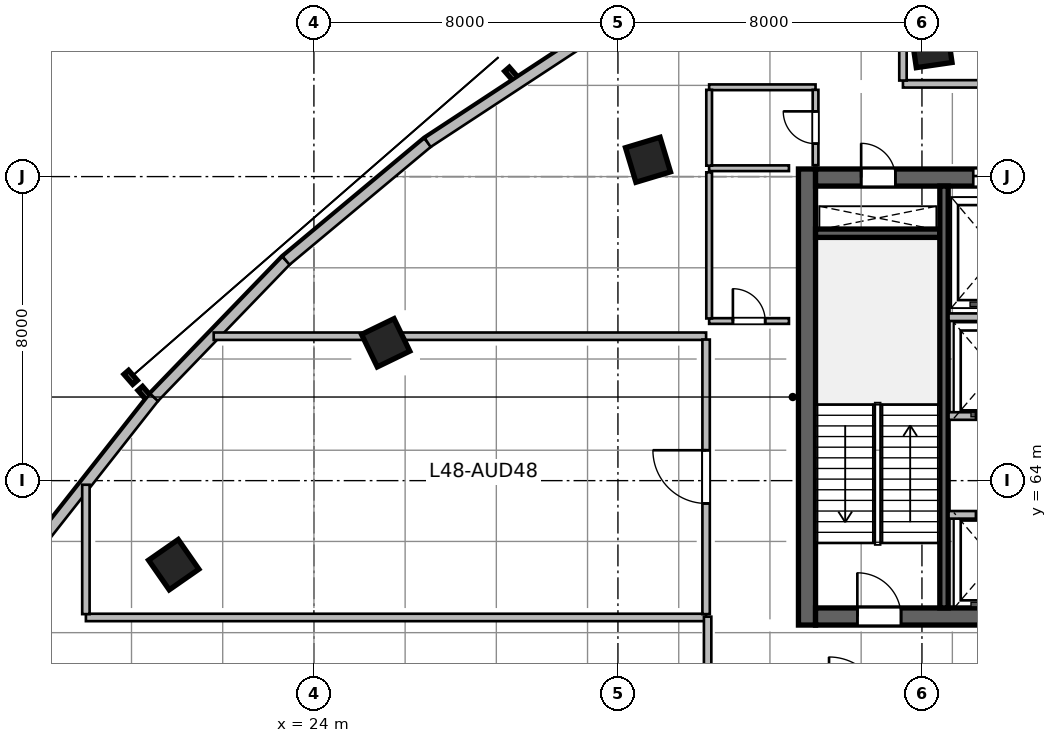
"""IFC4 building model, lengths in metres.
Left out: names, types, materials, properties, quantities, classifications, styles, units other than length and angle.
Written with IfcOpenShell. Run it as: python <this file> out.ifc"""

import sys

from ifc_helpers import new_model, si_unit, direction, frame, frame_2d, origin, origin_2d, place, context, subcontext, project, spatial, rectangle, extrude, source, transform, mapped, element, fill, save


model = new_model("IFC4")
c1 = context("Model", 3, precision=1e-05, world=origin(), true_north=direction((0.0, 1.0)))
c2 = subcontext(c1, "Body", "Model", "MODEL_VIEW")
j1 = project(units=[si_unit("LENGTHUNIT", "METRE"), si_unit("PLANEANGLEUNIT", "RADIAN")], contexts=[c1])
p1 = place(None, origin())
s1 = spatial("IfcSite", under=j1, at=p1, CompositionType="ELEMENT")
p2 = place(p1, origin())
s2 = spatial("IfcBuilding", under=s1, at=p2, CompositionType="ELEMENT")
p3 = place(p2, frame((0.0, 0.0, 199.2)))
s3 = spatial("IfcBuildingStorey", under=s2, at=p3, CompositionType="ELEMENT", Elevation=199.2)
m1 = source(origin(), c2, "Body", "SweptSolid", [
    extrude(rectangle(XDim=12.0, YDim=0.45, at=frame_2d((6.0, 0.0))), origin(), (0.0, 0.0, 1.0), 4.8),
])
p4 = place(p3, frame((36.975, 60.2, 0.0), z_axis=(0.0, 0.0, 1.0), x_axis=(0.0, 1.0, 0.0)))
e1 = element("IfcWall", 1, at=p4, inside=s3, PredefinedType="SHEAR", context=c2, shape_type="MappedRepresentation", body=[
    mapped(m1, transform((0.0, 0.0, 0.0), scale=1.0)),
])
m2 = source(origin(), c2, "Body", "SweptSolid", [
    extrude(rectangle(XDim=21.6, YDim=0.45, at=frame_2d((10.8, 0.0))), origin(), (0.0, 0.0, 1.0), 4.8),
])
p5 = place(p3, frame((37.2, 60.425, 0.0), z_axis=(0.0, 0.0, 1.0), x_axis=(1.0, 0.0, 0.0)))
e2 = element("IfcWall", 2, at=p5, inside=s3, PredefinedType="SHEAR", context=c2, shape_type="MappedRepresentation", body=[
    mapped(m2, transform((0.0, 0.0, 0.0), scale=1.0)),
])
p6 = place(p5, frame((1.1, 0.0, 0.0)))
e3 = element("IfcOpeningElement", 3, at=p6, cuts=e2, PredefinedType="OPENING", context=c2, shape_type="SweptSolid", body=[
    extrude(rectangle(XDim=1.15, YDim=2.15, at=frame_2d((0.575, 1.075))), frame((0.0, 0.235, 0.0), z_axis=(0.0, -1.0, 0.0), x_axis=(1.0, 0.0, 0.0)), (0.0, 0.0, 1.0), 0.47),
])
p7 = place(p5, frame((19.5, 0.0, 0.0)))
e4 = element("IfcOpeningElement", 4, at=p7, cuts=e2, PredefinedType="OPENING", context=c2, shape_type="SweptSolid", body=[
    extrude(rectangle(XDim=0.9, YDim=2.1, at=frame_2d((0.45, 1.05))), frame((0.0, 0.235, 0.0), z_axis=(0.0, -1.0, 0.0), x_axis=(1.0, 0.0, 0.0)), (0.0, 0.0, 1.0), 0.47),
])
p8 = place(p5, frame((12.02, 0.0, 0.0)))
e5 = element("IfcOpeningElement", 5, at=p8, cuts=e2, PredefinedType="OPENING", context=c2, shape_type="SweptSolid", body=[
    extrude(rectangle(XDim=1.6, YDim=2.15, at=frame_2d((0.8, 1.075))), frame((0.0, 0.235, 0.0), z_axis=(0.0, -1.0, 0.0), x_axis=(1.0, 0.0, 0.0)), (0.0, 0.0, 1.0), 0.47),
])
p9 = place(p3, frame((37.2, 71.975, 0.0), z_axis=(0.0, 0.0, 1.0), x_axis=(1.0, 0.0, 0.0)))
e6 = element("IfcWall", 6, at=p9, inside=s3, PredefinedType="SHEAR", context=c2, shape_type="MappedRepresentation", body=[
    mapped(m2, transform((0.0, 0.0, 0.0), scale=1.0)),
])
p10 = place(p9, frame((1.2, 0.0, 0.0)))
e7 = element("IfcOpeningElement", 7, at=p10, cuts=e6, PredefinedType="OPENING", context=c2, shape_type="SweptSolid", body=[
    extrude(rectangle(XDim=0.9, YDim=2.1, at=frame_2d((0.45, 1.05))), frame((0.0, 0.235, 0.0), z_axis=(0.0, -1.0, 0.0), x_axis=(1.0, 0.0, 0.0)), (0.0, 0.0, 1.0), 0.47),
])
p11 = place(p9, frame((14.7, 0.0, 0.0)))
e8 = element("IfcOpeningElement", 8, at=p11, cuts=e6, PredefinedType="OPENING", context=c2, shape_type="SweptSolid", body=[
    extrude(rectangle(XDim=1.2, YDim=2.15, at=frame_2d((0.6, 1.075))), frame((0.0, 0.235, 0.0), z_axis=(0.0, -1.0, 0.0), x_axis=(1.0, 0.0, 0.0)), (0.0, 0.0, 1.0), 0.47),
])
p12 = place(p9, frame((4.15, 0.0, 0.0)))
e9 = element("IfcOpeningElement", 9, at=p12, cuts=e6, PredefinedType="OPENING", context=c2, shape_type="SweptSolid", body=[
    extrude(rectangle(XDim=1.3, YDim=2.15, at=frame_2d((0.65, 1.075))), frame((0.0, 0.235, 0.0), z_axis=(0.0, -1.0, 0.0), x_axis=(1.0, 0.0, 0.0)), (0.0, 0.0, 1.0), 0.47),
])
p13 = place(p9, frame((7.25, 0.0, 0.0)))
e10 = element("IfcOpeningElement", 10, at=p13, cuts=e6, PredefinedType="OPENING", context=c2, shape_type="SweptSolid", body=[
    extrude(rectangle(XDim=0.9, YDim=2.1, at=frame_2d((0.45, 1.05))), frame((0.0, 0.235, 0.0), z_axis=(0.0, -1.0, 0.0), x_axis=(1.0, 0.0, 0.0)), (0.0, 0.0, 1.0), 0.47),
])
p14 = place(p9, frame((10.95, 0.0, 0.0)))
e11 = element("IfcOpeningElement", 11, at=p14, cuts=e6, PredefinedType="OPENING", context=c2, shape_type="SweptSolid", body=[
    extrude(rectangle(XDim=0.9, YDim=2.1, at=frame_2d((0.45, 1.05))), frame((0.0, 0.235, 0.0), z_axis=(0.0, -1.0, 0.0), x_axis=(1.0, 0.0, 0.0)), (0.0, 0.0, 1.0), 0.47),
])
m3 = source(origin(), c2, "Body", "SweptSolid", [
    extrude(rectangle(XDim=3.27, YDim=0.22, at=frame_2d((1.635, 0.0))), origin(), (0.0, 0.0, 1.0), 4.8),
])
p15 = place(p3, frame((37.2, 70.51, 0.0), z_axis=(0.0, 0.0, 1.0), x_axis=(1.0, 0.0, 0.0)))
e12 = element("IfcWall", 12, at=p15, inside=s3, PredefinedType="SHEAR", context=c2, shape_type="MappedRepresentation", body=[
    mapped(m3, transform((0.0, 0.0, 0.0), scale=1.0)),
])
m4 = source(origin(), c2, "Body", "SweptSolid", [
    extrude(rectangle(XDim=11.1, YDim=0.22, at=frame_2d((5.55, 0.0))), origin(), (0.0, 0.0, 1.0), 4.8),
])
p16 = place(p3, frame((40.58, 60.65, 0.0), z_axis=(0.0, 0.0, 1.0), x_axis=(0.0, 1.0, 0.0)))
e13 = element("IfcWall", 13, at=p16, inside=s3, PredefinedType="SHEAR", context=c2, shape_type="MappedRepresentation", body=[
    mapped(m4, transform((0.0, 0.0, 0.0), scale=1.0)),
])
m5 = source(origin(), c2, "Body", "SweptSolid", [
    extrude(rectangle(XDim=0.95, YDim=0.95, at=origin_2d()), origin(), (0.0, 0.0, 1.0), 4.8),
])
for number, where, z_axis, x_axis in (
    (14, (20.311, 61.789, 0.0), (0.0, 0.0, 1.0), (-0.571, 0.821, 0.0)),
    (15, (25.888, 67.627, 0.0), (0.0, 0.0, 1.0), (-0.436, 0.9, 0.0)),
    (16, (32.791, 72.442, 0.0), (0.0, 0.0, 1.0), (-0.289, 0.957, 0.0)),
    (17, (40.253, 75.404, 0.0), (0.0, 0.0, 1.0), (-0.143, 0.99, 0.0)),
):
    element("IfcColumn", number, at=place(p3, frame(where, z_axis=z_axis, x_axis=x_axis)), inside=s3, PredefinedType="COLUMN", context=c2, shape_type="MappedRepresentation", body=[
        mapped(m5, transform((0.0, 0.0, 0.0), scale=1.0)),
    ])
m6 = source(origin(), c2, "Body", "SweptSolid", [
    extrude(rectangle(XDim=5.153, YDim=0.28, at=frame_2d((2.577, 0.0))), origin(), (0.0, 0.0, 1.0), 4.54),
])
p17 = place(p3, frame((16.609, 62.14, 0.0), z_axis=(0.0, 0.0, 1.0), x_axis=(0.618179283891, 0.786037132054, 0.0)))
e18 = element("IfcWall", 18, at=p17, inside=s3, PredefinedType="SOLIDWALL", context=c2, shape_type="MappedRepresentation", body=[
    mapped(m6, transform((0.0, 0.0, 0.0), scale=1.0)),
])
m7 = source(origin(), c2, "Body", "SweptSolid", [
    extrude(rectangle(XDim=5.001, YDim=0.28, at=frame_2d((2.5, 0.0))), origin(), (0.0, 0.0, 1.0), 4.54),
])
p18 = place(p3, frame((19.795, 66.19, 0.0), z_axis=(0.0, 0.0, 1.0), x_axis=(0.694572731818, 0.719422490762, 0.0)))
e19 = element("IfcWall", 19, at=p18, inside=s3, PredefinedType="SOLIDWALL", context=c2, shape_type="MappedRepresentation", body=[
    mapped(m7, transform((0.0, 0.0, 0.0), scale=1.0)),
])
m8 = source(origin(), c2, "Body", "SweptSolid", [
    extrude(rectangle(XDim=4.852, YDim=0.28, at=frame_2d((2.426, 0.0))), origin(), (0.0, 0.0, 1.0), 4.54),
])
p19 = place(p3, frame((23.268, 69.788, 0.0), z_axis=(0.0, 0.0, 1.0), x_axis=(0.767936605821, 0.640525853843, 0.0)))
e20 = element("IfcWall", 20, at=p19, inside=s3, PredefinedType="SOLIDWALL", context=c2, shape_type="MappedRepresentation", body=[
    mapped(m8, transform((0.0, 0.0, 0.0), scale=1.0)),
])
m9 = source(origin(), c2, "Body", "SweptSolid", [
    extrude(rectangle(XDim=4.713, YDim=0.28, at=frame_2d((2.356, 0.0))), origin(), (0.0, 0.0, 1.0), 4.54),
])
p20 = place(p3, frame((26.994, 72.896, 0.0), z_axis=(0.0, 0.0, 1.0), x_axis=(0.835974386457, 0.548768462275, 0.0)))
e21 = element("IfcWall", 21, at=p20, inside=s3, PredefinedType="SOLIDWALL", context=c2, shape_type="MappedRepresentation", body=[
    mapped(m9, transform((0.0, 0.0, 0.0), scale=1.0)),
])
m10 = source(origin(), c2, "Body", "SweptSolid", [
    extrude(rectangle(XDim=8.8, YDim=0.2, at=frame_2d((4.4, 0.0))), origin(), (0.0, 0.0, 1.0), 4.54),
])
p21 = place(p3, frame((40.7, 68.3, 0.0), z_axis=(0.0, 0.0, 1.0), x_axis=(1.0, 0.0, 0.0)))
e22 = element("IfcWall", 22, at=p21, inside=s3, PredefinedType="SOLIDWALL", context=c2, shape_type="MappedRepresentation", body=[
    mapped(m10, transform((0.0, 0.0, 0.0), scale=1.0)),
])
m11 = source(origin(), c2, "Body", "SweptSolid", [
    extrude(rectangle(XDim=8.02, YDim=0.2, at=frame_2d((4.01, 0.0))), origin(), (0.0, 0.0, 1.0), 4.54),
])
p22 = place(p3, frame((40.7, 63.1, 0.0), z_axis=(0.0, 0.0, 1.0), x_axis=(1.0, 0.0, 0.0)))
e23 = element("IfcWall", 23, at=p22, inside=s3, PredefinedType="SOLIDWALL", context=c2, shape_type="MappedRepresentation", body=[
    mapped(m11, transform((0.0, 0.0, 0.0), scale=1.0)),
])
p23 = place(p22, frame((0.72, 0.0, 0.0)))
e24 = element("IfcOpeningElement", 24, at=p23, cuts=e23, PredefinedType="OPENING", context=c2, shape_type="SweptSolid", body=[
    extrude(rectangle(XDim=1.0, YDim=2.15, at=frame_2d((0.5, 1.075))), frame((0.0, 0.11, 0.0), z_axis=(0.0, -1.0, 0.0), x_axis=(1.0, 0.0, 0.0)), (0.0, 0.0, 1.0), 0.22),
])
p24 = place(p22, frame((2.62, 0.0, 0.0)))
e25 = element("IfcOpeningElement", 25, at=p24, cuts=e23, PredefinedType="OPENING", context=c2, shape_type="SweptSolid", body=[
    extrude(rectangle(XDim=1.0, YDim=2.15, at=frame_2d((0.5, 1.075))), frame((0.0, 0.11, 0.0), z_axis=(0.0, -1.0, 0.0), x_axis=(1.0, 0.0, 0.0)), (0.0, 0.0, 1.0), 0.22),
])
p25 = place(p22, frame((4.55, 0.0, 0.0)))
e26 = element("IfcOpeningElement", 26, at=p25, cuts=e23, PredefinedType="OPENING", context=c2, shape_type="SweptSolid", body=[
    extrude(rectangle(XDim=1.0, YDim=2.15, at=frame_2d((0.5, 1.075))), frame((0.0, 0.11, 0.0), z_axis=(0.0, -1.0, 0.0), x_axis=(1.0, 0.0, 0.0)), (0.0, 0.0, 1.0), 0.22),
])
p26 = place(p22, frame((6.55, 0.0, 0.0)))
e27 = element("IfcOpeningElement", 27, at=p26, cuts=e23, PredefinedType="OPENING", context=c2, shape_type="SweptSolid", body=[
    extrude(rectangle(XDim=1.0, YDim=2.15, at=frame_2d((0.5, 1.075))), frame((0.0, 0.11, 0.0), z_axis=(0.0, -1.0, 0.0), x_axis=(1.0, 0.0, 0.0)), (0.0, 0.0, 1.0), 0.22),
])
p27 = place(p3, frame((40.7, 65.7, 0.0), z_axis=(0.0, 0.0, 1.0), x_axis=(1.0, 0.0, 0.0)))
e28 = element("IfcWall", 28, at=p27, inside=s3, PredefinedType="SOLIDWALL", context=c2, shape_type="MappedRepresentation", body=[
    mapped(m10, transform((0.0, 0.0, 0.0), scale=1.0)),
])
p28 = place(p27, frame((0.72, 0.0, 0.0)))
e29 = element("IfcOpeningElement", 29, at=p28, cuts=e28, PredefinedType="OPENING", context=c2, shape_type="SweptSolid", body=[
    extrude(rectangle(XDim=1.0, YDim=2.15, at=frame_2d((0.5, 1.075))), frame((0.0, 0.11, 0.0), z_axis=(0.0, -1.0, 0.0), x_axis=(1.0, 0.0, 0.0)), (0.0, 0.0, 1.0), 0.22),
])
p29 = place(p27, frame((2.62, 0.0, 0.0)))
e30 = element("IfcOpeningElement", 30, at=p29, cuts=e28, PredefinedType="OPENING", context=c2, shape_type="SweptSolid", body=[
    extrude(rectangle(XDim=1.0, YDim=2.15, at=frame_2d((0.5, 1.075))), frame((0.0, 0.11, 0.0), z_axis=(0.0, -1.0, 0.0), x_axis=(1.0, 0.0, 0.0)), (0.0, 0.0, 1.0), 0.22),
])
p30 = place(p27, frame((4.55, 0.0, 0.0)))
e31 = element("IfcOpeningElement", 31, at=p30, cuts=e28, PredefinedType="OPENING", context=c2, shape_type="SweptSolid", body=[
    extrude(rectangle(XDim=1.0, YDim=2.15, at=frame_2d((0.5, 1.075))), frame((0.0, 0.11, 0.0), z_axis=(0.0, -1.0, 0.0), x_axis=(1.0, 0.0, 0.0)), (0.0, 0.0, 1.0), 0.22),
])
p31 = place(p27, frame((6.55, 0.0, 0.0)))
e32 = element("IfcOpeningElement", 32, at=p31, cuts=e28, PredefinedType="OPENING", context=c2, shape_type="SweptSolid", body=[
    extrude(rectangle(XDim=1.0, YDim=2.15, at=frame_2d((0.5, 1.075))), frame((0.0, 0.11, 0.0), z_axis=(0.0, -1.0, 0.0), x_axis=(1.0, 0.0, 0.0)), (0.0, 0.0, 1.0), 0.22),
])
m12 = source(origin(), c2, "Body", "SweptSolid", [
    extrude(rectangle(XDim=2.1, YDim=0.15, at=frame_2d((1.05, 0.0))), origin(), (0.0, 0.0, 1.0), 4.54),
])
p32 = place(p3, frame((34.4, 72.22, 0.0), z_axis=(0.0, 0.0, 1.0), x_axis=(1.0, 0.0, 0.0)))
e33 = element("IfcWall", 33, at=p32, inside=s3, PredefinedType="PARTITIONING", context=c2, shape_type="MappedRepresentation", body=[
    mapped(m12, transform((0.0, 0.0, 0.0), scale=1.0)),
])
m13 = source(origin(), c2, "Body", "SweptSolid", [
    extrude(rectangle(XDim=2.8, YDim=0.15, at=frame_2d((1.4, 0.0))), origin(), (0.0, 0.0, 1.0), 4.54),
])
p33 = place(p3, frame((34.4, 74.35, 0.0), z_axis=(0.0, 0.0, 1.0), x_axis=(1.0, 0.0, 0.0)))
e34 = element("IfcWall", 34, at=p33, inside=s3, PredefinedType="PARTITIONING", context=c2, shape_type="MappedRepresentation", body=[
    mapped(m13, transform((0.0, 0.0, 0.0), scale=1.0)),
])
m14 = source(origin(), c2, "Body", "SweptSolid", [
    extrude(rectangle(XDim=1.995, YDim=0.15, at=frame_2d((0.998, 0.0))), origin(), (0.0, 0.0, 1.0), 4.54),
])
p34 = place(p3, frame((34.4, 72.288, 0.0), z_axis=(0.0, 0.0, 1.0), x_axis=(0.0, 1.0, 0.0)))
e35 = element("IfcWall", 35, at=p34, inside=s3, PredefinedType="PARTITIONING", context=c2, shape_type="MappedRepresentation", body=[
    mapped(m14, transform((0.0, 0.0, 0.0), scale=1.0)),
])
m15 = source(origin(), c2, "Body", "SweptSolid", [
    extrude(rectangle(XDim=1.982, YDim=0.15, at=frame_2d((0.991, 0.0))), origin(), (0.0, 0.0, 1.0), 4.54),
])
p35 = place(p3, frame((37.2, 72.3, 0.0), z_axis=(0.0, 0.0, 1.0), x_axis=(0.0, 1.0, 0.0)))
e36 = element("IfcWall", 36, at=p35, inside=s3, PredefinedType="PARTITIONING", context=c2, shape_type="MappedRepresentation", body=[
    mapped(m15, transform((0.0, 0.0, 0.0), scale=1.0)),
])
p36 = place(p35, frame((0.566, 0.0, 0.0)))
e37 = element("IfcOpeningElement", 37, at=p36, cuts=e36, PredefinedType="OPENING", context=c2, shape_type="SweptSolid", body=[
    extrude(rectangle(XDim=0.85, YDim=2.1, at=frame_2d((0.425, 1.05))), frame((0.0, 0.085, 0.0), z_axis=(0.0, -1.0, 0.0), x_axis=(1.0, 0.0, 0.0)), (0.0, 0.0, 1.0), 0.17),
])
p37 = place(p3, frame((34.4, 68.2, 0.0), z_axis=(0.0, 0.0, 1.0), x_axis=(1.0, 0.0, 0.0)))
e38 = element("IfcWall", 38, at=p37, inside=s3, PredefinedType="PARTITIONING", context=c2, shape_type="MappedRepresentation", body=[
    mapped(m12, transform((0.0, 0.0, 0.0), scale=1.0)),
])
p38 = place(p37, frame((0.625, 0.0, 0.0)))
e39 = element("IfcOpeningElement", 39, at=p38, cuts=e38, PredefinedType="OPENING", context=c2, shape_type="SweptSolid", body=[
    extrude(rectangle(XDim=0.85, YDim=2.1, at=frame_2d((0.425, 1.05))), frame((0.0, 0.085, 0.0), z_axis=(0.0, -1.0, 0.0), x_axis=(1.0, 0.0, 0.0)), (0.0, 0.0, 1.0), 0.17),
])
m16 = source(origin(), c2, "Body", "SweptSolid", [
    extrude(rectangle(XDim=3.845, YDim=0.15, at=frame_2d((1.922, 0.0))), origin(), (0.0, 0.0, 1.0), 4.54),
])
p39 = place(p3, frame((34.4, 68.268, 0.0), z_axis=(0.0, 0.0, 1.0), x_axis=(0.0, 1.0, 0.0)))
e40 = element("IfcWall", 40, at=p39, inside=s3, PredefinedType="PARTITIONING", context=c2, shape_type="MappedRepresentation", body=[
    mapped(m16, transform((0.0, 0.0, 0.0), scale=1.0)),
])
m17 = source(origin(), c2, "Body", "SweptSolid", [
    extrude(rectangle(XDim=7.3, YDim=0.195, at=frame_2d((3.65, 0.0))), origin(), (0.0, 0.0, 1.0), 4.54),
])
p40 = place(p3, frame((39.5, 74.44, 0.0), z_axis=(0.0, 0.0, 1.0), x_axis=(1.0, 0.0, 0.0)))
e41 = element("IfcWall", 41, at=p40, inside=s3, PredefinedType="PARTITIONING", context=c2, shape_type="MappedRepresentation", body=[
    mapped(m17, transform((0.0, 0.0, 0.0), scale=1.0)),
])
p41 = place(p40, frame((3.1, 0.0, 0.0)))
e42 = element("IfcOpeningElement", 42, at=p41, cuts=e41, PredefinedType="OPENING", context=c2, shape_type="SweptSolid", body=[
    extrude(rectangle(XDim=1.1, YDim=2.15, at=frame_2d((0.55, 1.075))), frame((0.0, 0.107, 0.0), z_axis=(0.0, -1.0, 0.0), x_axis=(1.0, 0.0, 0.0)), (0.0, 0.0, 1.0), 0.215),
])
m18 = source(origin(), c2, "Body", "SweptSolid", [
    extrude(rectangle(XDim=2.785, YDim=0.195, at=frame_2d((1.392, 0.0))), origin(), (0.0, 0.0, 1.0), 4.54),
])
p42 = place(p3, frame((39.5, 74.528, 0.0), z_axis=(0.0, 0.0, 1.0), x_axis=(0.0, 1.0, 0.0)))
e43 = element("IfcWall", 43, at=p42, inside=s3, PredefinedType="PARTITIONING", context=c2, shape_type="MappedRepresentation", body=[
    mapped(m18, transform((0.0, 0.0, 0.0), scale=1.0)),
])
m19 = source(origin(), c2, "Body", "SweptSolid", [
    extrude(rectangle(XDim=16.32, YDim=0.195, at=frame_2d((8.16, 0.0))), origin(), (0.0, 0.0, 1.0), 4.54),
])
p43 = place(p3, frame((18.0, 60.4, 0.0), z_axis=(0.0, 0.0, 1.0), x_axis=(1.0, 0.0, 0.0)))
e44 = element("IfcWall", 44, at=p43, inside=s3, PredefinedType="PARTITIONING", context=c2, shape_type="MappedRepresentation", body=[
    mapped(m19, transform((0.0, 0.0, 0.0), scale=1.0)),
])
m20 = source(origin(), c2, "Body", "SweptSolid", [
    extrude(rectangle(XDim=12.957, YDim=0.195, at=frame_2d((6.479, 0.0))), origin(), (0.0, 0.0, 1.0), 3.971),
])
p44 = place(p3, frame((21.363, 67.8, 0.0), z_axis=(0.0, 0.0, 1.0), x_axis=(1.0, 0.0, 0.0)))
e45 = element("IfcWall", 45, at=p44, inside=s3, PredefinedType="PARTITIONING", context=c2, shape_type="MappedRepresentation", body=[
    mapped(m20, transform((0.0, 0.0, 0.0), scale=1.0)),
])
m21 = source(origin(), c2, "Body", "SweptSolid", [
    extrude(rectangle(XDim=3.404, YDim=0.195, at=frame_2d((1.702, 0.0))), origin(), (0.0, 0.0, 1.0), 4.54),
])
p45 = place(p3, frame((18.0, 60.488, 0.0), z_axis=(0.0, 0.0, 1.0), x_axis=(0.0, 1.0, 0.0)))
e46 = element("IfcWall", 46, at=p45, inside=s3, PredefinedType="PARTITIONING", context=c2, shape_type="MappedRepresentation", body=[
    mapped(m21, transform((0.0, 0.0, 0.0), scale=1.0)),
])
m22 = source(origin(), c2, "Body", "SweptSolid", [
    extrude(rectangle(XDim=7.224, YDim=0.195, at=frame_2d((3.612, 0.0))), origin(), (0.0, 0.0, 1.0), 4.54),
])
p46 = place(p3, frame((34.32, 60.488, 0.0), z_axis=(0.0, 0.0, 1.0), x_axis=(0.0, 1.0, 0.0)))
e47 = element("IfcWall", 47, at=p46, inside=s3, PredefinedType="PARTITIONING", context=c2, shape_type="MappedRepresentation", body=[
    mapped(m22, transform((0.0, 0.0, 0.0), scale=1.0)),
])
p47 = place(p46, frame((2.912, 0.0, 0.0)))
e48 = element("IfcOpeningElement", 48, at=p47, cuts=e47, PredefinedType="OPENING", context=c2, shape_type="SweptSolid", body=[
    extrude(rectangle(XDim=1.4, YDim=2.15, at=frame_2d((0.7, 1.075))), frame((0.0, 0.107, 0.0), z_axis=(0.0, -1.0, 0.0), x_axis=(1.0, 0.0, 0.0)), (0.0, 0.0, 1.0), 0.215),
])
m23 = source(origin(), c2, "Body", "SweptSolid", [
    extrude(rectangle(XDim=2.46, YDim=0.195, at=frame_2d((1.23, 0.0))), origin(), (0.0, 0.0, 1.0), 4.54),
])
p48 = place(p3, frame((34.36, 57.96, 0.0), z_axis=(0.0, 0.0, 1.0), x_axis=(0.0, 1.0, 0.0)))
e49 = element("IfcWall", 49, at=p48, inside=s3, PredefinedType="PARTITIONING", context=c2, shape_type="MappedRepresentation", body=[
    mapped(m23, transform((0.0, 0.0, 0.0), scale=1.0)),
])
m24 = source(origin(), c2, "Body", "SweptSolid", [
    extrude(rectangle(XDim=1.15, YDim=2.15, at=frame_2d((0.575, 1.075))), frame((0.0, 0.025, 0.0), z_axis=(0.0, -1.0, 0.0), x_axis=(1.0, 0.0, 0.0)), (0.0, 0.0, 1.0), 0.05),
])
p49 = place(p6, origin())
e50 = element("IfcDoor", 50, at=p49, inside=s3, OperationType="SINGLE_SWING_LEFT", PredefinedType="DOOR", context=c2, shape_type="MappedRepresentation", body=[
    mapped(m24, transform((0.0, 0.0, 0.0), scale=1.0)),
])
fill(e3, e50)
m25 = source(origin(), c2, "Body", "SweptSolid", [
    extrude(rectangle(XDim=0.9, YDim=2.1, at=frame_2d((0.45, 1.05))), frame((0.0, 0.025, 0.0), z_axis=(0.0, -1.0, 0.0), x_axis=(1.0, 0.0, 0.0)), (0.0, 0.0, 1.0), 0.05),
])
p50 = place(p10, origin())
e51 = element("IfcDoor", 51, at=p50, inside=s3, OperationType="SINGLE_SWING_LEFT", PredefinedType="DOOR", context=c2, shape_type="MappedRepresentation", body=[
    mapped(m25, transform((0.0, 0.0, 0.0), scale=1.0)),
])
fill(e7, e51)
m26 = source(origin(), c2, "Body", "SweptSolid", [
    extrude(rectangle(XDim=1.3, YDim=2.15, at=frame_2d((0.65, 1.075))), frame((0.0, 0.025, 0.0), z_axis=(0.0, -1.0, 0.0), x_axis=(1.0, 0.0, 0.0)), (0.0, 0.0, 1.0), 0.05),
])
p51 = place(p12, origin())
e52 = element("IfcDoor", 52, at=p51, inside=s3, OperationType="DOUBLE_DOOR_SLIDING", PredefinedType="DOOR", context=c2, shape_type="MappedRepresentation", body=[
    mapped(m26, transform((0.0, 0.0, 0.0), scale=1.0)),
])
fill(e9, e52)
m27 = source(origin(), c2, "Body", "SweptSolid", [
    extrude(rectangle(XDim=1.0, YDim=2.15, at=frame_2d((0.5, 1.075))), frame((0.0, 0.025, 0.0), z_axis=(0.0, -1.0, 0.0), x_axis=(1.0, 0.0, 0.0)), (0.0, 0.0, 1.0), 0.05),
])
p52 = place(p23, origin())
e53 = element("IfcDoor", 53, at=p52, inside=s3, OperationType="DOUBLE_DOOR_SLIDING", PredefinedType="DOOR", context=c2, shape_type="MappedRepresentation", body=[
    mapped(m27, transform((0.0, 0.0, 0.0), scale=1.0)),
])
fill(e24, e53)
p53 = place(p28, origin())
e54 = element("IfcDoor", 54, at=p53, inside=s3, OperationType="DOUBLE_DOOR_SLIDING", PredefinedType="DOOR", context=c2, shape_type="MappedRepresentation", body=[
    mapped(m27, transform((0.0, 0.0, 0.0), scale=1.0)),
])
fill(e29, e54)
m28 = source(origin(), c2, "Body", "SweptSolid", [
    extrude(rectangle(XDim=0.85, YDim=2.1, at=frame_2d((0.425, 1.05))), frame((0.0, 0.025, 0.0), z_axis=(0.0, -1.0, 0.0), x_axis=(1.0, 0.0, 0.0)), (0.0, 0.0, 1.0), 0.05),
])
p54 = place(p36, origin())
e55 = element("IfcDoor", 55, at=p54, inside=s3, OperationType="SINGLE_SWING_RIGHT", PredefinedType="DOOR", context=c2, shape_type="MappedRepresentation", body=[
    mapped(m28, transform((0.0, 0.0, 0.0), scale=1.0)),
])
fill(e37, e55)
p55 = place(p38, origin())
e56 = element("IfcDoor", 56, at=p55, inside=s3, OperationType="SINGLE_SWING_LEFT", PredefinedType="DOOR", context=c2, shape_type="MappedRepresentation", body=[
    mapped(m28, transform((0.0, 0.0, 0.0), scale=1.0)),
])
fill(e39, e56)
m29 = source(origin(), c2, "Body", "SweptSolid", [
    extrude(rectangle(XDim=1.4, YDim=2.15, at=frame_2d((0.7, 1.075))), frame((0.0, 0.025, 0.0), z_axis=(0.0, -1.0, 0.0), x_axis=(1.0, 0.0, 0.0)), (0.0, 0.0, 1.0), 0.05),
])
p56 = place(p47, origin())
e57 = element("IfcDoor", 57, at=p56, inside=s3, OperationType="SINGLE_SWING_RIGHT", PredefinedType="DOOR", context=c2, shape_type="MappedRepresentation", body=[
    mapped(m29, transform((0.0, 0.0, 0.0), scale=1.0)),
])
fill(e48, e57)
save(model, sys.argv[1])
